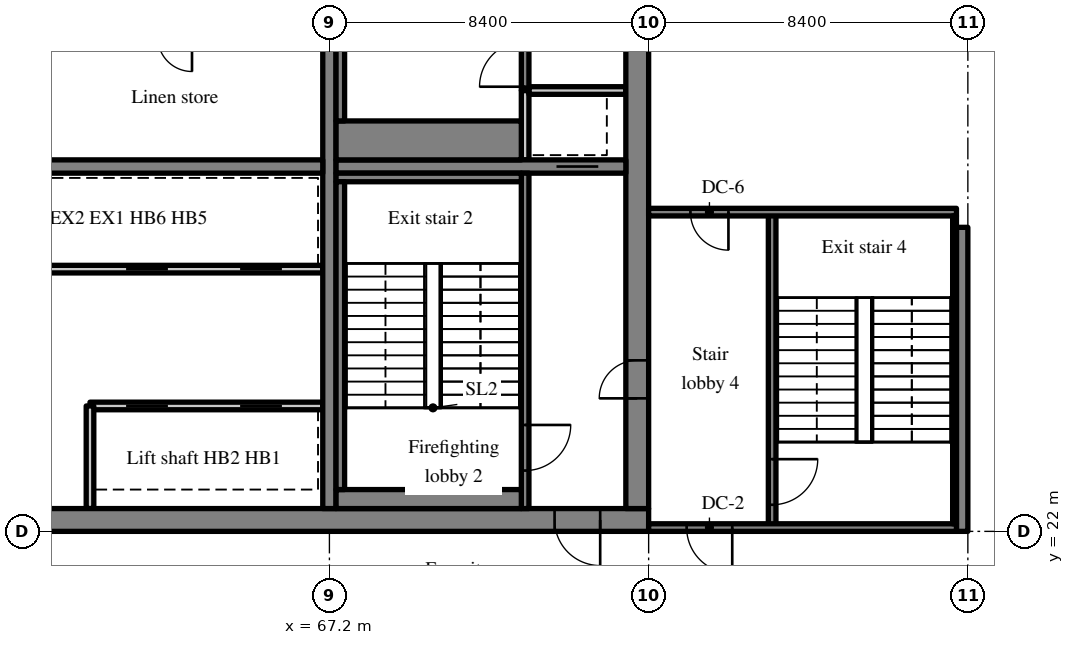
"""IFC4 building model, lengths in metres.
Left out: names, types, materials, properties, quantities, classifications, styles, units other than length and angle.
Written with IfcOpenShell. Run it as: python <this file> out.ifc"""

import sys

from ifc_helpers import new_model, si_unit, direction, frame, frame_2d, origin, place, context, subcontext, project, spatial, rectangle, extrude, source, transform, mapped, element, fill, save


model = new_model("IFC4")
c1 = context("Model", 3, precision=1e-05, world=origin(), true_north=direction((0.0, 1.0)))
c2 = subcontext(c1, "Body", "Model", "MODEL_VIEW")
j1 = project(units=[si_unit("LENGTHUNIT", "METRE"), si_unit("PLANEANGLEUNIT", "RADIAN")], contexts=[c1])
p1 = place(None, origin())
s1 = spatial("IfcSite", under=j1, at=p1, CompositionType="ELEMENT")
p2 = place(p1, origin())
s2 = spatial("IfcBuilding", under=s1, at=p2, CompositionType="ELEMENT")
p3 = place(p2, frame((0.0, 0.0, 253.0)))
s3 = spatial("IfcBuildingStorey", under=s2, at=p3, CompositionType="ELEMENT", Elevation=253.0)
m1 = source(origin(), c2, "Body", "SweptSolid", [
    extrude(rectangle(XDim=50.4, YDim=0.6, at=frame_2d((25.2, 0.0))), origin(), (0.0, 0.0, 1.0), 3.62),
])
p4 = place(p3, frame((25.2, 22.3, 0.0), z_axis=(0.0, 0.0, 1.0), x_axis=(1.0, 0.0, 0.0)))
e1 = element("IfcWall", 1, at=p4, inside=s3, PredefinedType="SHEAR", context=c2, shape_type="MappedRepresentation", body=[
    mapped(m1, transform((0.0, 0.0, 0.0), scale=1.0)),
])
m2 = source(origin(), c2, "Body", "SweptSolid", [
    extrude(rectangle(XDim=1.8, YDim=2.1, at=frame_2d((0.9, 1.05))), frame((0.0, 0.31, 0.0), z_axis=(0.0, -1.0, 0.0), x_axis=(1.0, 0.0, 0.0)), (0.0, 0.0, 1.0), 0.62),
])
p5 = place(p4, frame((15.9, 0.0, 0.0)))
e2 = element("IfcOpeningElement", 2, at=p5, cuts=e1, PredefinedType="OPENING", context=c2, shape_type="MappedRepresentation", body=[
    mapped(m2, transform((0.0, 0.0, 0.0), scale=1.0)),
])
m3 = source(origin(), c2, "Body", "SweptSolid", [
    extrude(rectangle(XDim=0.9, YDim=2.1, at=frame_2d((0.45, 1.05))), frame((0.0, 0.31, 0.0), z_axis=(0.0, -1.0, 0.0), x_axis=(1.0, 0.0, 0.0)), (0.0, 0.0, 1.0), 0.62),
])
p6 = place(p4, frame((21.513, 0.0, 0.0)))
e3 = element("IfcOpeningElement", 3, at=p6, cuts=e1, PredefinedType="OPENING", context=c2, shape_type="MappedRepresentation", body=[
    mapped(m3, transform((0.0, 0.0, 0.0), scale=1.0)),
])
p7 = place(p4, frame((32.7, 0.0, 0.0)))
e4 = element("IfcOpeningElement", 4, at=p7, cuts=e1, PredefinedType="OPENING", context=c2, shape_type="MappedRepresentation", body=[
    mapped(m2, transform((0.0, 0.0, 0.0), scale=1.0)),
])
m4 = source(origin(), c2, "Body", "SweptSolid", [
    extrude(rectangle(XDim=1.2, YDim=2.1, at=frame_2d((0.6, 1.05))), frame((0.0, 0.31, 0.0), z_axis=(0.0, -1.0, 0.0), x_axis=(1.0, 0.0, 0.0)), (0.0, 0.0, 1.0), 0.62),
])
p8 = place(p4, frame((6.488, 0.0, 0.0)))
e5 = element("IfcOpeningElement", 5, at=p8, cuts=e1, PredefinedType="OPENING", context=c2, shape_type="MappedRepresentation", body=[
    mapped(m4, transform((0.0, 0.0, 0.0), scale=1.0)),
])
p9 = place(p4, frame((47.925, 0.0, 0.0)))
e6 = element("IfcOpeningElement", 6, at=p9, cuts=e1, PredefinedType="OPENING", context=c2, shape_type="MappedRepresentation", body=[
    mapped(m4, transform((0.0, 0.0, 0.0), scale=1.0)),
])
m5 = source(origin(), c2, "Body", "SweptSolid", [
    extrude(rectangle(XDim=18.8, YDim=0.6, at=frame_2d((9.4, 0.0))), origin(), (0.0, 0.0, 1.0), 3.62),
])
p10 = place(p3, frame((75.3, 22.6, 0.0), z_axis=(0.0, 0.0, 1.0), x_axis=(0.0, 1.0, 0.0)))
e7 = element("IfcWall", 7, at=p10, inside=s3, PredefinedType="SHEAR", context=c2, shape_type="MappedRepresentation", body=[
    mapped(m5, transform((0.0, 0.0, 0.0), scale=1.0)),
])
m6 = source(origin(), c2, "Body", "SweptSolid", [
    extrude(rectangle(XDim=1.0, YDim=2.1, at=frame_2d((0.5, 1.05))), frame((0.0, 0.31, 0.0), z_axis=(0.0, -1.0, 0.0), x_axis=(1.0, 0.0, 0.0)), (0.0, 0.0, 1.0), 0.62),
])
p11 = place(p10, frame((2.9, 0.0, 0.0)))
e8 = element("IfcOpeningElement", 8, at=p11, cuts=e7, PredefinedType="OPENING", context=c2, shape_type="MappedRepresentation", body=[
    mapped(m6, transform((0.0, 0.0, 0.0), scale=1.0)),
])
p12 = place(p10, frame((12.8, 0.0, 0.0)))
e9 = element("IfcOpeningElement", 9, at=p12, cuts=e7, PredefinedType="OPENING", context=c2, shape_type="MappedRepresentation", body=[
    mapped(m4, transform((0.0, 0.0, 0.0), scale=1.0)),
])
m7 = source(origin(), c2, "Body", "SweptSolid", [
    extrude(rectangle(XDim=18.8, YDim=0.35, at=frame_2d((9.4, 0.0))), origin(), (0.0, 0.0, 1.0), 3.62),
])
p13 = place(p3, frame((67.2, 22.6, 0.0), z_axis=(0.0, 0.0, 1.0), x_axis=(0.0, 1.0, 0.0)))
e10 = element("IfcWall", 10, at=p13, inside=s3, PredefinedType="SHEAR", context=c2, shape_type="MappedRepresentation", body=[
    mapped(m7, transform((0.0, 0.0, 0.0), scale=1.0)),
])
m8 = source(origin(), c2, "Body", "SweptSolid", [
    extrude(rectangle(XDim=16.45, YDim=0.35, at=frame_2d((8.225, 0.0))), origin(), (0.0, 0.0, 1.0), 3.62),
])
p14 = place(p3, frame((50.575, 31.6, 0.0), z_axis=(0.0, 0.0, 1.0), x_axis=(1.0, 0.0, 0.0)))
e11 = element("IfcWall", 11, at=p14, inside=s3, PredefinedType="SHEAR", context=c2, shape_type="MappedRepresentation", body=[
    mapped(m8, transform((0.0, 0.0, 0.0), scale=1.0)),
])
m9 = source(origin(), c2, "Body", "SweptSolid", [
    extrude(rectangle(XDim=1.0, YDim=2.1, at=frame_2d((0.5, 1.05))), frame((0.0, 0.185, 0.0), z_axis=(0.0, -1.0, 0.0), x_axis=(1.0, 0.0, 0.0)), (0.0, 0.0, 1.0), 0.37),
])
p15 = place(p14, frame((0.613, 0.0, 0.0)))
e12 = element("IfcOpeningElement", 12, at=p15, cuts=e11, PredefinedType="OPENING", context=c2, shape_type="MappedRepresentation", body=[
    mapped(m9, transform((0.0, 0.0, 0.0), scale=1.0)),
])
m10 = source(origin(), c2, "Body", "SweptSolid", [
    extrude(rectangle(XDim=7.625, YDim=0.35, at=frame_2d((3.812, 0.0))), origin(), (0.0, 0.0, 1.0), 3.62),
])
p16 = place(p3, frame((67.375, 31.6, 0.0), z_axis=(0.0, 0.0, 1.0), x_axis=(1.0, 0.0, 0.0)))
e13 = element("IfcWall", 13, at=p16, inside=s3, PredefinedType="SHEAR", context=c2, shape_type="MappedRepresentation", body=[
    mapped(m10, transform((0.0, 0.0, 0.0), scale=1.0)),
])
m11 = source(origin(), c2, "Body", "SweptSolid", [
    extrude(rectangle(XDim=1.1, YDim=2.1, at=frame_2d((0.55, 1.05))), frame((0.0, 0.185, 0.0), z_axis=(0.0, -1.0, 0.0), x_axis=(1.0, 0.0, 0.0)), (0.0, 0.0, 1.0), 0.37),
])
p17 = place(p16, frame((5.8, 0.0, 0.0)))
e14 = element("IfcOpeningElement", 14, at=p17, cuts=e13, PredefinedType="OPENING", context=c2, shape_type="MappedRepresentation", body=[
    mapped(m11, transform((0.0, 0.0, 0.0), scale=1.0)),
])
m12 = source(origin(), c2, "Body", "SweptSolid", [
    extrude(rectangle(XDim=8.0, YDim=0.3, at=frame_2d((4.0, 0.0))), origin(), (0.0, 0.0, 1.0), 3.62),
])
p18 = place(p3, frame((83.85, 22.0, 0.0), z_axis=(0.0, 0.0, 1.0), x_axis=(0.0, 1.0, 0.0)))
e15 = element("IfcWall", 15, at=p18, inside=s3, PredefinedType="SHEAR", context=c2, shape_type="MappedRepresentation", body=[
    mapped(m12, transform((0.0, 0.0, 0.0), scale=1.0)),
])
m13 = source(origin(), c2, "Body", "SweptSolid", [
    extrude(rectangle(XDim=6.125, YDim=0.2, at=frame_2d((3.062, 0.0))), origin(), (0.0, 0.0, 1.0), 3.62),
])
p19 = place(p3, frame((67.025, 25.3, 0.0), z_axis=(0.0, 0.0, 1.0), x_axis=(-1.0, 0.0, 0.0)))
e16 = element("IfcWall", 16, at=p19, inside=s3, PredefinedType="SOLIDWALL", context=c2, shape_type="MappedRepresentation", body=[
    mapped(m13, transform((0.0, 0.0, 0.0), scale=1.0)),
])
m14 = source(origin(), c2, "Body", "SweptSolid", [
    extrude(rectangle(XDim=1.1, YDim=2.1, at=frame_2d((0.55, 1.05))), frame((0.0, 0.11, 0.0), z_axis=(0.0, -1.0, 0.0), x_axis=(1.0, 0.0, 0.0)), (0.0, 0.0, 1.0), 0.22),
])
p20 = place(p19, frame((1.075, 0.0, 0.0)))
e17 = element("IfcOpeningElement", 17, at=p20, cuts=e16, PredefinedType="OPENING", context=c2, shape_type="MappedRepresentation", body=[
    mapped(m14, transform((0.0, 0.0, 0.0), scale=1.0)),
])
p21 = place(p19, frame((4.075, 0.0, 0.0)))
e18 = element("IfcOpeningElement", 18, at=p21, cuts=e16, PredefinedType="OPENING", context=c2, shape_type="MappedRepresentation", body=[
    mapped(m14, transform((0.0, 0.0, 0.0), scale=1.0)),
])
m15 = source(origin(), c2, "Body", "SweptSolid", [
    extrude(rectangle(XDim=12.125, YDim=0.2, at=frame_2d((6.062, 0.0))), origin(), (0.0, 0.0, 1.0), 3.62),
])
p22 = place(p3, frame((67.025, 28.9, 0.0), z_axis=(0.0, 0.0, 1.0), x_axis=(-1.0, 0.0, 0.0)))
e19 = element("IfcWall", 19, at=p22, inside=s3, PredefinedType="SOLIDWALL", context=c2, shape_type="MappedRepresentation", body=[
    mapped(m15, transform((0.0, 0.0, 0.0), scale=1.0)),
])
p23 = place(p22, frame((1.075, 0.0, 0.0)))
e20 = element("IfcOpeningElement", 20, at=p23, cuts=e19, PredefinedType="OPENING", context=c2, shape_type="MappedRepresentation", body=[
    mapped(m14, transform((0.0, 0.0, 0.0), scale=1.0)),
])
p24 = place(p22, frame((4.075, 0.0, 0.0)))
e21 = element("IfcOpeningElement", 21, at=p24, cuts=e19, PredefinedType="OPENING", context=c2, shape_type="MappedRepresentation", body=[
    mapped(m14, transform((0.0, 0.0, 0.0), scale=1.0)),
])
m16 = source(origin(), c2, "Body", "SweptSolid", [
    extrude(rectangle(XDim=2.7, YDim=0.2, at=frame_2d((1.35, 0.0))), origin(), (0.0, 0.0, 1.0), 3.62),
])
p25 = place(p3, frame((60.9, 22.6, 0.0), z_axis=(0.0, 0.0, 1.0), x_axis=(0.0, 1.0, 0.0)))
e22 = element("IfcWall", 22, at=p25, inside=s3, PredefinedType="SOLIDWALL", context=c2, shape_type="MappedRepresentation", body=[
    mapped(m16, transform((0.0, 0.0, 0.0), scale=1.0)),
])
m17 = source(origin(), c2, "Body", "SweptSolid", [
    extrude(rectangle(XDim=8.825, YDim=0.2, at=frame_2d((4.413, 0.0))), origin(), (0.0, 0.0, 1.0), 3.62),
])
p26 = place(p3, frame((72.35, 22.6, 0.0), z_axis=(0.0, 0.0, 1.0), x_axis=(0.0, 1.0, 0.0)))
e23 = element("IfcWall", 23, at=p26, inside=s3, PredefinedType="SOLIDWALL", context=c2, shape_type="MappedRepresentation", body=[
    mapped(m17, transform((0.0, 0.0, 0.0), scale=1.0)),
])
m18 = source(origin(), c2, "Body", "SweptSolid", [
    extrude(rectangle(XDim=1.2, YDim=2.1, at=frame_2d((0.6, 1.05))), frame((0.0, 0.11, 0.0), z_axis=(0.0, -1.0, 0.0), x_axis=(1.0, 0.0, 0.0)), (0.0, 0.0, 1.0), 0.22),
])
p27 = place(p26, frame((1.0, 0.0, 0.0)))
e24 = element("IfcOpeningElement", 24, at=p27, cuts=e23, PredefinedType="OPENING", context=c2, shape_type="MappedRepresentation", body=[
    mapped(m18, transform((0.0, 0.0, 0.0), scale=1.0)),
])
m19 = source(origin(), c2, "Body", "SweptSolid", [
    extrude(rectangle(XDim=1.825, YDim=0.2, at=frame_2d((0.913, 0.0))), origin(), (0.0, 0.0, 1.0), 3.62),
])
p28 = place(p3, frame((72.35, 31.775, 0.0), z_axis=(0.0, 0.0, 1.0), x_axis=(0.0, 1.0, 0.0)))
e25 = element("IfcWall", 25, at=p28, inside=s3, PredefinedType="SOLIDWALL", context=c2, shape_type="MappedRepresentation", body=[
    mapped(m19, transform((0.0, 0.0, 0.0), scale=1.0)),
])
m20 = source(origin(), c2, "Body", "SweptSolid", [
    extrude(rectangle(XDim=2.55, YDim=0.2, at=frame_2d((1.275, 0.0))), origin(), (0.0, 0.0, 1.0), 3.62),
])
p29 = place(p3, frame((72.45, 33.6, 0.0), z_axis=(0.0, 0.0, 1.0), x_axis=(1.0, 0.0, 0.0)))
e26 = element("IfcWall", 26, at=p29, inside=s3, PredefinedType="SOLIDWALL", context=c2, shape_type="MappedRepresentation", body=[
    mapped(m20, transform((0.0, 0.0, 0.0), scale=1.0)),
])
m21 = source(origin(), c2, "Body", "SweptSolid", [
    extrude(rectangle(XDim=7.8, YDim=0.2, at=frame_2d((3.9, 0.0))), origin(), (0.0, 0.0, 1.0), 3.62),
])
p30 = place(p3, frame((72.35, 33.6, 0.0), z_axis=(0.0, 0.0, 1.0), x_axis=(0.0, 1.0, 0.0)))
e27 = element("IfcWall", 27, at=p30, inside=s3, PredefinedType="SOLIDWALL", context=c2, shape_type="MappedRepresentation", body=[
    mapped(m21, transform((0.0, 0.0, 0.0), scale=1.0)),
])
p31 = place(p30, frame((0.1, 0.0, 0.0)))
e28 = element("IfcOpeningElement", 28, at=p31, cuts=e27, PredefinedType="OPENING", context=c2, shape_type="MappedRepresentation", body=[
    mapped(m18, transform((0.0, 0.0, 0.0), scale=1.0)),
])
m22 = source(origin(), c2, "Body", "SweptSolid", [
    extrude(rectangle(XDim=8.3, YDim=0.2, at=frame_2d((4.15, 0.0))), origin(), (0.0, 0.0, 1.0), 3.62),
])
p32 = place(p3, frame((78.85, 22.1, 0.0), z_axis=(0.0, 0.0, 1.0), x_axis=(0.0, 1.0, 0.0)))
e29 = element("IfcWall", 29, at=p32, inside=s3, PredefinedType="SOLIDWALL", context=c2, shape_type="MappedRepresentation", body=[
    mapped(m22, transform((0.0, 0.0, 0.0), scale=1.0)),
])
p33 = place(p32, frame((0.6, 0.0, 0.0)))
e30 = element("IfcOpeningElement", 30, at=p33, cuts=e29, PredefinedType="OPENING", context=c2, shape_type="MappedRepresentation", body=[
    mapped(m18, transform((0.0, 0.0, 0.0), scale=1.0)),
])
m23 = source(origin(), c2, "Body", "SweptSolid", [
    extrude(rectangle(XDim=8.1, YDim=0.2, at=frame_2d((4.05, 0.0))), origin(), (0.0, 0.0, 1.0), 3.62),
])
p34 = place(p3, frame((83.7, 22.1, 0.0), z_axis=(0.0, 0.0, 1.0), x_axis=(-1.0, 0.0, 0.0)))
e31 = element("IfcWall", 31, at=p34, inside=s3, PredefinedType="SOLIDWALL", context=c2, shape_type="MappedRepresentation", body=[
    mapped(m23, transform((0.0, 0.0, 0.0), scale=1.0)),
])
p35 = place(p34, frame((5.9, 0.0, 0.0)))
e32 = element("IfcOpeningElement", 32, at=p35, cuts=e31, PredefinedType="OPENING", context=c2, shape_type="MappedRepresentation", body=[
    mapped(m18, transform((0.0, 0.0, 0.0), scale=1.0)),
])
p36 = place(p3, frame((83.7, 30.4, 0.0), z_axis=(0.0, 0.0, 1.0), x_axis=(-1.0, 0.0, 0.0)))
e33 = element("IfcWall", 33, at=p36, inside=s3, PredefinedType="SOLIDWALL", context=c2, shape_type="MappedRepresentation", body=[
    mapped(m23, transform((0.0, 0.0, 0.0), scale=1.0)),
])
m24 = source(origin(), c2, "Body", "SweptSolid", [
    extrude(rectangle(XDim=1.0, YDim=2.1, at=frame_2d((0.5, 1.05))), frame((0.0, 0.11, 0.0), z_axis=(0.0, -1.0, 0.0), x_axis=(1.0, 0.0, 0.0)), (0.0, 0.0, 1.0), 0.22),
])
p37 = place(p36, frame((6.0, 0.0, 0.0)))
e34 = element("IfcOpeningElement", 34, at=p37, cuts=e33, PredefinedType="OPENING", context=c2, shape_type="MappedRepresentation", body=[
    mapped(m24, transform((0.0, 0.0, 0.0), scale=1.0)),
])
m25 = source(origin(), c2, "Body", "SweptSolid", [
    extrude(rectangle(XDim=4.875, YDim=0.5, at=frame_2d((2.438, 0.0))), origin(), (0.0, 0.0, 1.0), 3.62),
])
p38 = place(p3, frame((67.375, 22.85, 0.0), z_axis=(0.0, 0.0, 1.0), x_axis=(1.0, 0.0, 0.0)))
e35 = element("IfcWall", 35, at=p38, inside=s3, PredefinedType="SOLIDWALL", context=c2, shape_type="MappedRepresentation", body=[
    mapped(m25, transform((0.0, 0.0, 0.0), scale=1.0)),
])
m26 = source(origin(), c2, "Body", "SweptSolid", [
    extrude(rectangle(XDim=4.875, YDim=0.225, at=frame_2d((2.438, 0.0))), origin(), (0.0, 0.0, 1.0), 3.62),
])
p39 = place(p3, frame((67.375, 31.312, 0.0), z_axis=(0.0, 0.0, 1.0), x_axis=(1.0, 0.0, 0.0)))
e36 = element("IfcWall", 36, at=p39, inside=s3, PredefinedType="SOLIDWALL", context=c2, shape_type="MappedRepresentation", body=[
    mapped(m26, transform((0.0, 0.0, 0.0), scale=1.0)),
])
m27 = source(origin(), c2, "Body", "SweptSolid", [
    extrude(rectangle(XDim=8.1, YDim=0.225, at=frame_2d((4.05, 0.0))), origin(), (0.0, 0.0, 1.0), 3.62),
])
p40 = place(p3, frame((67.487, 23.1, 0.0), z_axis=(0.0, 0.0, 1.0), x_axis=(0.0, 1.0, 0.0)))
e37 = element("IfcWall", 37, at=p40, inside=s3, PredefinedType="SOLIDWALL", context=c2, shape_type="MappedRepresentation", body=[
    mapped(m27, transform((0.0, 0.0, 0.0), scale=1.0)),
])
m28 = source(origin(), c2, "Body", "SweptSolid", [
    extrude(rectangle(XDim=4.875, YDim=1.025, at=frame_2d((2.438, 0.0))), origin(), (0.0, 0.0, 1.0), 3.62),
])
p41 = place(p3, frame((67.375, 32.287, 0.0), z_axis=(0.0, 0.0, 1.0), x_axis=(1.0, 0.0, 0.0)))
e38 = element("IfcWall", 38, at=p41, inside=s3, PredefinedType="SOLIDWALL", context=c2, shape_type="MappedRepresentation", body=[
    mapped(m28, transform((0.0, 0.0, 0.0), scale=1.0)),
])
p42 = place(p3, frame((67.487, 32.8, 0.0), z_axis=(0.0, 0.0, 1.0), x_axis=(0.0, 1.0, 0.0)))
e39 = element("IfcWall", 39, at=p42, inside=s3, PredefinedType="SOLIDWALL", context=c2, shape_type="MappedRepresentation", body=[
    mapped(m27, transform((0.0, 0.0, 0.0), scale=1.0)),
])
m29 = source(origin(), c2, "Body", "SweptSolid", [
    extrude(rectangle(XDim=8.1, YDim=0.1, at=frame_2d((4.05, 0.0))), origin(), (0.0, 0.0, 1.0), 3.62),
])
p43 = place(p3, frame((83.65, 22.2, 0.0), z_axis=(0.0, 0.0, 1.0), x_axis=(0.0, 1.0, 0.0)))
e40 = element("IfcWall", 40, at=p43, inside=s3, PredefinedType="SOLIDWALL", context=c2, shape_type="MappedRepresentation", body=[
    mapped(m29, transform((0.0, 0.0, 0.0), scale=1.0)),
])
m30 = source(origin(), c2, "Body", "SweptSolid", [
    extrude(rectangle(XDim=1.1, YDim=2.1, at=frame_2d((0.55, 1.05))), frame((0.0, 0.025, 0.0), z_axis=(0.0, -1.0, 0.0), x_axis=(1.0, 0.0, 0.0)), (0.0, 0.0, 1.0), 0.05),
])
p44 = place(p20, origin())
e41 = element("IfcDoor", 41, at=p44, inside=s3, OperationType="SLIDING_TO_RIGHT", PredefinedType="DOOR", context=c2, shape_type="MappedRepresentation", body=[
    mapped(m30, transform((0.0, 0.0, 0.0), scale=1.0)),
])
fill(e17, e41)
p45 = place(p21, origin())
e42 = element("IfcDoor", 42, at=p45, inside=s3, OperationType="SLIDING_TO_LEFT", PredefinedType="DOOR", context=c2, shape_type="MappedRepresentation", body=[
    mapped(m30, transform((0.0, 0.0, 0.0), scale=1.0)),
])
fill(e18, e42)
p46 = place(p23, origin())
e43 = element("IfcDoor", 43, at=p46, inside=s3, OperationType="SLIDING_TO_RIGHT", PredefinedType="DOOR", context=c2, shape_type="MappedRepresentation", body=[
    mapped(m30, transform((0.0, 0.0, 0.0), scale=1.0)),
])
fill(e20, e43)
p47 = place(p24, origin())
e44 = element("IfcDoor", 44, at=p47, inside=s3, OperationType="SLIDING_TO_LEFT", PredefinedType="DOOR", context=c2, shape_type="MappedRepresentation", body=[
    mapped(m30, transform((0.0, 0.0, 0.0), scale=1.0)),
])
fill(e21, e44)
m31 = source(origin(), c2, "Body", "SweptSolid", [
    extrude(rectangle(XDim=1.2, YDim=2.1, at=frame_2d((0.6, 1.05))), frame((0.0, 0.025, 0.0), z_axis=(0.0, -1.0, 0.0), x_axis=(1.0, 0.0, 0.0)), (0.0, 0.0, 1.0), 0.05),
])
p48 = place(p27, origin())
e45 = element("IfcDoor", 45, at=p48, inside=s3, OperationType="SINGLE_SWING_RIGHT", PredefinedType="DOOR", context=c2, shape_type="MappedRepresentation", body=[
    mapped(m31, transform((0.0, 0.0, 0.0), scale=1.0)),
])
fill(e24, e45)
m32 = source(origin(), c2, "Body", "SweptSolid", [
    extrude(rectangle(XDim=1.2, YDim=2.1, at=frame_2d((0.6, 1.05))), frame((0.0, 0.225, 0.0), z_axis=(0.0, -1.0, 0.0), x_axis=(1.0, 0.0, 0.0)), (0.0, 0.0, 1.0), 0.05),
])
p49 = place(p9, origin())
e46 = element("IfcDoor", 46, at=p49, inside=s3, OperationType="SINGLE_SWING_RIGHT", PredefinedType="DOOR", context=c2, shape_type="MappedRepresentation", body=[
    mapped(m32, transform((0.0, 0.0, 0.0), scale=1.0)),
])
fill(e6, e46)
p50 = place(p17, origin())
e47 = element("IfcDoor", 47, at=p50, inside=s3, OperationType="SLIDING_TO_RIGHT", PredefinedType="DOOR", context=c2, shape_type="MappedRepresentation", body=[
    mapped(m30, transform((0.0, 0.0, 0.0), scale=1.0)),
])
fill(e14, e47)
m33 = source(origin(), c2, "Body", "SweptSolid", [
    extrude(rectangle(XDim=1.0, YDim=2.1, at=frame_2d((0.5, 1.05))), frame((0.0, 0.025, 0.0), z_axis=(0.0, -1.0, 0.0), x_axis=(1.0, 0.0, 0.0)), (0.0, 0.0, 1.0), 0.05),
])
p51 = place(p11, origin())
e48 = element("IfcDoor", 48, at=p51, inside=s3, OperationType="SINGLE_SWING_LEFT", PredefinedType="DOOR", context=c2, shape_type="MappedRepresentation", body=[
    mapped(m33, transform((0.0, 0.0, 0.0), scale=1.0)),
])
fill(e8, e48)
p52 = place(p31, origin())
e49 = element("IfcDoor", 49, at=p52, inside=s3, OperationType="SINGLE_SWING_LEFT", PredefinedType="DOOR", context=c2, shape_type="MappedRepresentation", body=[
    mapped(m31, transform((0.0, 0.0, 0.0), scale=1.0)),
])
fill(e28, e49)
p53 = place(p33, origin())
e50 = element("IfcDoor", 50, at=p53, inside=s3, OperationType="SINGLE_SWING_RIGHT", PredefinedType="DOOR", context=c2, shape_type="MappedRepresentation", body=[
    mapped(m31, transform((0.0, 0.0, 0.0), scale=1.0)),
])
fill(e30, e50)
p54 = place(p35, origin())
e51 = element("IfcDoor", 51, at=p54, inside=s3, OperationType="SINGLE_SWING_LEFT", PredefinedType="DOOR", context=c2, shape_type="MappedRepresentation", body=[
    mapped(m31, transform((0.0, 0.0, 0.0), scale=1.0)),
])
fill(e32, e51)
p55 = place(p37, origin())
e52 = element("IfcDoor", 52, at=p55, inside=s3, OperationType="SINGLE_SWING_LEFT", PredefinedType="DOOR", context=c2, shape_type="MappedRepresentation", body=[
    mapped(m33, transform((0.0, 0.0, 0.0), scale=1.0)),
])
fill(e34, e52)
save(model, sys.argv[1])
